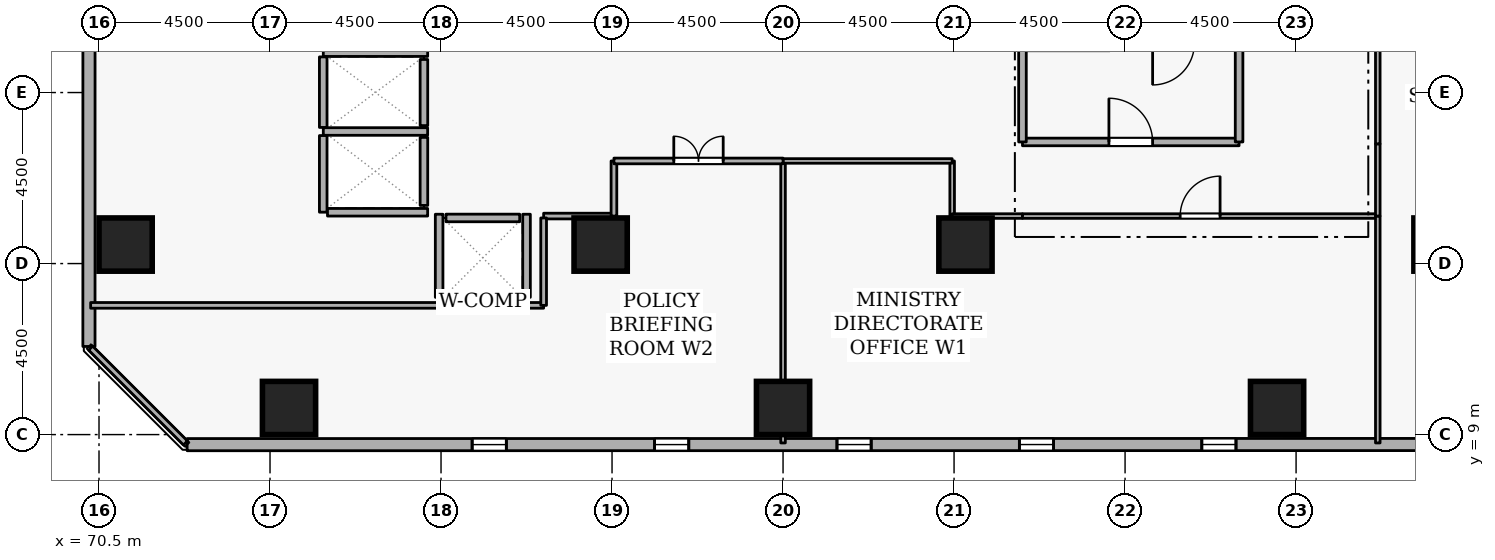
"""IFC4 building model, lengths in metres.
Left out: names, types, materials, properties, quantities, classifications, styles, units other than length and angle.
Written with IfcOpenShell. Run it as: python <this file> out.ifc"""

import sys

from ifc_helpers import new_model, si_unit, direction, frame, frame_2d, origin, origin_2d, place, context, subcontext, project, spatial, rectangle, extrude, element, fill, save


model = new_model("IFC4")
c1 = context("Model", 3, precision=1e-05, world=origin(), true_north=direction((0.0, 1.0)))
c2 = subcontext(c1, "Body", "Model", "MODEL_VIEW")
j1 = project(units=[si_unit("LENGTHUNIT", "METRE"), si_unit("PLANEANGLEUNIT", "RADIAN")], contexts=[c1])
p1 = place(None, origin())
s1 = spatial("IfcSite", under=j1, at=p1, CompositionType="ELEMENT")
p2 = place(p1, origin())
s2 = spatial("IfcBuilding", under=s1, at=p2, CompositionType="ELEMENT")
p3 = place(p2, frame((0.0, 0.0, 53.7)))
s3 = spatial("IfcBuildingStorey", under=s2, at=p3, CompositionType="ELEMENT", Elevation=53.7)
for number, where, z_axis, x_axis in (
    (1, (105.8, 14.0, 0.0), (0.0, 0.0, 1.0), (1.0, 0.0, 0.0)),
    (2, (71.2, 14.0, 0.0), (0.0, 0.0, 1.0), (1.0, 0.0, 0.0)),
    (3, (101.5, 9.7, 0.0), (0.0, 0.0, 1.0), (1.0, 0.0, 0.0)),
    (4, (88.5, 9.7, 0.0), (0.0, 0.0, 1.0), (1.0, 0.0, 0.0)),
    (5, (75.5, 9.7, 0.0), (0.0, 0.0, 1.0), (1.0, 0.0, 0.0)),
    (6, (93.3, 14.0, 0.0), (0.0, 0.0, 1.0), (1.0, 0.0, 0.0)),
    (7, (83.7, 14.0, 0.0), (0.0, 0.0, 1.0), (1.0, 0.0, 0.0)),
):
    element("IfcColumn", number, at=place(p3, frame(where, z_axis=z_axis, x_axis=x_axis)), inside=s3, PredefinedType="COLUMN", context=c2, shape_type="SweptSolid", body=[
        extrude(rectangle(XDim=1.4, YDim=1.4, at=origin_2d()), origin(), (0.0, 0.0, 1.0), 3.6),
    ])
p4 = place(p3, frame((72.819, 8.735, 0.0), z_axis=(0.0, 0.0, 1.0), x_axis=(0.999999992574, 0.000121872777, 0.0)))
e8 = element("IfcWall", 8, at=p4, inside=s3, PredefinedType="STANDARD", context=c2, shape_type="SweptSolid", body=[
    extrude(rectangle(XDim=36.058, YDim=0.32, at=frame_2d((18.029, 0.0))), origin(), (0.0, 0.0, 1.0), 2.7),
])
p5 = place(p4, frame((7.5, 0.0, 0.72)))
e9 = element("IfcOpeningElement", 9, at=p5, cuts=e8, PredefinedType="OPENING", context=c2, shape_type="SweptSolid", body=[
    extrude(rectangle(XDim=0.9, YDim=1.75, at=frame_2d((0.45, 0.875))), frame((0.0, 0.17, 0.0), z_axis=(0.0, -1.0, 0.0), x_axis=(1.0, 0.0, 0.0)), (0.0, 0.0, 1.0), 0.34),
])
p6 = place(p4, frame((12.3, 0.0, 0.72)))
e10 = element("IfcOpeningElement", 10, at=p6, cuts=e8, PredefinedType="OPENING", context=c2, shape_type="SweptSolid", body=[
    extrude(rectangle(XDim=0.9, YDim=1.75, at=frame_2d((0.45, 0.875))), frame((0.0, 0.17, 0.0), z_axis=(0.0, -1.0, 0.0), x_axis=(1.0, 0.0, 0.0)), (0.0, 0.0, 1.0), 0.34),
])
p7 = place(p4, frame((17.1, 0.0, 0.72)))
e11 = element("IfcOpeningElement", 11, at=p7, cuts=e8, PredefinedType="OPENING", context=c2, shape_type="SweptSolid", body=[
    extrude(rectangle(XDim=0.9, YDim=1.75, at=frame_2d((0.45, 0.875))), frame((0.0, 0.17, 0.0), z_axis=(0.0, -1.0, 0.0), x_axis=(1.0, 0.0, 0.0)), (0.0, 0.0, 1.0), 0.34),
])
p8 = place(p4, frame((21.9, 0.0, 0.72)))
e12 = element("IfcOpeningElement", 12, at=p8, cuts=e8, PredefinedType="OPENING", context=c2, shape_type="SweptSolid", body=[
    extrude(rectangle(XDim=0.9, YDim=1.75, at=frame_2d((0.45, 0.875))), frame((0.0, 0.17, 0.0), z_axis=(0.0, -1.0, 0.0), x_axis=(1.0, 0.0, 0.0)), (0.0, 0.0, 1.0), 0.34),
])
p9 = place(p4, frame((26.7, 0.0, 0.72)))
e13 = element("IfcOpeningElement", 13, at=p9, cuts=e8, PredefinedType="OPENING", context=c2, shape_type="SweptSolid", body=[
    extrude(rectangle(XDim=0.9, YDim=1.75, at=frame_2d((0.45, 0.875))), frame((0.0, 0.17, 0.0), z_axis=(0.0, -1.0, 0.0), x_axis=(1.0, 0.0, 0.0)), (0.0, 0.0, 1.0), 0.34),
])
p10 = place(p3, frame((70.24, 47.377, 0.0), z_axis=(0.0, 0.0, 1.0), x_axis=(-0.000121872777, -0.999999992574, 0.0)))
e14 = element("IfcWall", 14, at=p10, inside=s3, PredefinedType="STANDARD", context=c2, shape_type="SweptSolid", body=[
    extrude(rectangle(XDim=36.058, YDim=0.32, at=frame_2d((18.029, 0.0))), origin(), (0.0, 0.0, 1.0), 2.7),
])
p11 = place(p10, frame((2.7, 0.0, 0.72)))
e15 = element("IfcOpeningElement", 15, at=p11, cuts=e14, PredefinedType="OPENING", context=c2, shape_type="SweptSolid", body=[
    extrude(rectangle(XDim=0.9, YDim=1.75, at=frame_2d((0.45, 0.875))), frame((0.0, 0.17, 0.0), z_axis=(0.0, -1.0, 0.0), x_axis=(1.0, 0.0, 0.0)), (0.0, 0.0, 1.0), 0.34),
])
p12 = place(p10, frame((12.3, 0.0, 0.72)))
e16 = element("IfcOpeningElement", 16, at=p12, cuts=e14, PredefinedType="OPENING", context=c2, shape_type="SweptSolid", body=[
    extrude(rectangle(XDim=0.9, YDim=1.75, at=frame_2d((0.45, 0.875))), frame((0.0, 0.17, 0.0), z_axis=(0.0, -1.0, 0.0), x_axis=(1.0, 0.0, 0.0)), (0.0, 0.0, 1.0), 0.34),
])
p13 = place(p10, frame((17.1, 0.0, 0.72)))
e17 = element("IfcOpeningElement", 17, at=p13, cuts=e14, PredefinedType="OPENING", context=c2, shape_type="SweptSolid", body=[
    extrude(rectangle(XDim=0.9, YDim=1.75, at=frame_2d((0.45, 0.875))), frame((0.0, 0.17, 0.0), z_axis=(0.0, -1.0, 0.0), x_axis=(1.0, 0.0, 0.0)), (0.0, 0.0, 1.0), 0.34),
])
p14 = place(p10, frame((21.9, 0.0, 0.72)))
e18 = element("IfcOpeningElement", 18, at=p14, cuts=e14, PredefinedType="OPENING", context=c2, shape_type="SweptSolid", body=[
    extrude(rectangle(XDim=0.9, YDim=1.75, at=frame_2d((0.45, 0.875))), frame((0.0, 0.17, 0.0), z_axis=(0.0, -1.0, 0.0), x_axis=(1.0, 0.0, 0.0)), (0.0, 0.0, 1.0), 0.34),
])
p15 = place(p10, frame((26.7, 0.0, 0.72)))
e19 = element("IfcOpeningElement", 19, at=p15, cuts=e14, PredefinedType="OPENING", context=c2, shape_type="SweptSolid", body=[
    extrude(rectangle(XDim=0.9, YDim=1.75, at=frame_2d((0.45, 0.875))), frame((0.0, 0.17, 0.0), z_axis=(0.0, -1.0, 0.0), x_axis=(1.0, 0.0, 0.0)), (0.0, 0.0, 1.0), 0.34),
])
p16 = place(p3, frame((79.05, 17.13, 0.0), z_axis=(0.0, 0.0, 1.0), x_axis=(0.0, 1.0, 0.0)))
e20 = element("IfcWall", 20, at=p16, inside=s3, PredefinedType="STANDARD", context=c2, shape_type="SweptSolid", body=[
    extrude(rectangle(XDim=1.74, YDim=0.2, at=frame_2d((0.87, 0.0))), origin(), (0.0, 0.0, 1.0), 3.34),
])
p17 = place(p3, frame((79.05, 15.03, 0.0), z_axis=(0.0, 0.0, 1.0), x_axis=(0.0, 1.0, 0.0)))
e21 = element("IfcWall", 21, at=p17, inside=s3, PredefinedType="STANDARD", context=c2, shape_type="SweptSolid", body=[
    extrude(rectangle(XDim=1.79, YDim=0.2, at=frame_2d((0.895, 0.0))), origin(), (0.0, 0.0, 1.0), 3.34),
])
p18 = place(p3, frame((79.63, 14.7, 0.0), z_axis=(0.0, 0.0, 1.0), x_axis=(1.0, 0.0, 0.0)))
e22 = element("IfcWall", 22, at=p18, inside=s3, PredefinedType="STANDARD", context=c2, shape_type="SweptSolid", body=[
    extrude(rectangle(XDim=1.94, YDim=0.2, at=frame_2d((0.97, 0.0))), origin(), (0.0, 0.0, 1.0), 3.34),
])
p19 = place(p3, frame((76.402, 19.05, 0.0), z_axis=(0.0, 0.0, 1.0), x_axis=(1.0, 0.0, 0.0)))
e23 = element("IfcWall", 23, at=p19, inside=s3, PredefinedType="STANDARD", context=c2, shape_type="SweptSolid", body=[
    extrude(rectangle(XDim=2.746, YDim=0.2, at=frame_2d((1.373, 0.0))), origin(), (0.0, 0.0, 1.0), 2.545),
])
p20 = place(p3, frame((76.402, 16.975, 0.0), z_axis=(0.0, 0.0, 1.0), x_axis=(1.0, 0.0, 0.0)))
e24 = element("IfcWall", 24, at=p20, inside=s3, PredefinedType="STANDARD", context=c2, shape_type="SweptSolid", body=[
    extrude(rectangle(XDim=2.746, YDim=0.2, at=frame_2d((1.373, 0.0))), origin(), (0.0, 0.0, 1.0), 3.34),
])
p21 = place(p3, frame((76.4, 14.852, 0.0), z_axis=(0.0, 0.0, 1.0), x_axis=(0.0, 1.0, 0.0)))
e25 = element("IfcWall", 25, at=p21, inside=s3, PredefinedType="STANDARD", context=c2, shape_type="SweptSolid", body=[
    extrude(rectangle(XDim=2.016, YDim=0.2, at=frame_2d((1.008, 0.0))), origin(), (0.0, 0.0, 1.0), 3.34),
])
p22 = place(p3, frame((76.4, 17.082, 0.0), z_axis=(0.0, 0.0, 1.0), x_axis=(0.0, 1.0, 0.0)))
e26 = element("IfcWall", 26, at=p22, inside=s3, PredefinedType="STANDARD", context=c2, shape_type="SweptSolid", body=[
    extrude(rectangle(XDim=1.856, YDim=0.2, at=frame_2d((0.928, 0.0))), origin(), (0.0, 0.0, 1.0), 3.34),
])
p23 = place(p3, frame((76.512, 14.85, 0.0), z_axis=(0.0, 0.0, 1.0), x_axis=(1.0, 0.0, 0.0)))
e27 = element("IfcWall", 27, at=p23, inside=s3, PredefinedType="STANDARD", context=c2, shape_type="SweptSolid", body=[
    extrude(rectangle(XDim=2.636, YDim=0.2, at=frame_2d((1.318, 0.0))), origin(), (0.0, 0.0, 1.0), 3.34),
])
p24 = place(p3, frame((79.452, 12.5, 0.0), z_axis=(0.0, 0.0, 1.0), x_axis=(1.0, 0.0, 0.0)))
e28 = element("IfcWall", 28, at=p24, inside=s3, PredefinedType="STANDARD", context=c2, shape_type="SweptSolid", body=[
    extrude(rectangle(XDim=2.296, YDim=0.2, at=frame_2d((1.148, 0.0))), origin(), (0.0, 0.0, 1.0), 3.34),
])
for number, where, z_axis, x_axis in (
    (29, (81.75, 12.612, 0.0), (0.0, 0.0, 1.0), (0.0, 1.0, 0.0)),
    (30, (79.45, 12.612, 0.0), (0.0, 0.0, 1.0), (0.0, 1.0, 0.0)),
):
    element("IfcWall", number, at=place(p3, frame(where, z_axis=z_axis, x_axis=x_axis)), inside=s3, PredefinedType="STANDARD", context=c2, shape_type="SweptSolid", body=[
        extrude(rectangle(XDim=2.186, YDim=0.2, at=frame_2d((1.093, 0.0))), origin(), (0.0, 0.0, 1.0), 3.34),
    ])
p25 = place(p3, frame((94.8, 16.7, 0.0), z_axis=(0.0, 0.0, 1.0), x_axis=(1.0, 0.0, 0.0)))
e31 = element("IfcWall", 31, at=p25, inside=s3, PredefinedType="STANDARD", context=c2, shape_type="SweptSolid", body=[
    extrude(rectangle(XDim=5.7, YDim=0.2, at=frame_2d((2.85, 0.0))), origin(), (0.0, 0.0, 1.0), 3.34),
])
p26 = place(p25, frame((2.275, 0.0, 0.0)))
e32 = element("IfcOpeningElement", 32, at=p26, cuts=e31, PredefinedType="OPENING", context=c2, shape_type="SweptSolid", body=[
    extrude(rectangle(XDim=1.15, YDim=2.1, at=frame_2d((0.575, 1.05))), frame((0.0, 0.11, 0.0), z_axis=(0.0, -1.0, 0.0), x_axis=(1.0, 0.0, 0.0)), (0.0, 0.0, 1.0), 0.22),
])
for number, where, z_axis, x_axis in (
    (33, (100.5, 16.7, 0.0), (0.0, 0.0, 1.0), (0.0, 1.0, 0.0)),
    (34, (94.8, 19.2, 0.0), (0.0, 0.0, 1.0), (0.0, -1.0, 0.0)),
):
    element("IfcWall", number, at=place(p3, frame(where, z_axis=z_axis, x_axis=x_axis)), inside=s3, PredefinedType="STANDARD", context=c2, shape_type="SweptSolid", body=[
        extrude(rectangle(XDim=2.5, YDim=0.2, at=frame_2d((1.25, 0.0))), origin(), (0.0, 0.0, 1.0), 3.34),
    ])
p27 = place(p3, frame((92.95, 16.2, 0.0), z_axis=(0.0, 0.0, 1.0), x_axis=(0.0, -1.0, 0.0)))
e35 = element("IfcWall", 35, at=p27, inside=s3, PredefinedType="PARTITIONING", context=c2, shape_type="SweptSolid", body=[
    extrude(rectangle(XDim=1.45, YDim=0.12, at=frame_2d((0.725, 0.0))), origin(), (0.0, 0.0, 1.0), 3.34),
])
p28 = place(p3, frame((92.95, 14.75, 0.0), z_axis=(0.0, 0.0, 1.0), x_axis=(1.0, 0.0, 0.0)))
e36 = element("IfcWall", 36, at=p28, inside=s3, PredefinedType="PARTITIONING", context=c2, shape_type="SweptSolid", body=[
    extrude(rectangle(XDim=1.85, YDim=0.12, at=frame_2d((0.925, 0.0))), origin(), (0.0, 0.0, 1.0), 3.34),
])
p29 = place(p3, frame((94.8, 14.75, 0.0), z_axis=(0.0, 0.0, 1.0), x_axis=(1.0, 0.0, 0.0)))
e37 = element("IfcWall", 37, at=p29, inside=s3, PredefinedType="PARTITIONING", context=c2, shape_type="SweptSolid", body=[
    extrude(rectangle(XDim=9.35, YDim=0.12, at=frame_2d((4.675, 0.0))), origin(), (0.0, 0.0, 1.0), 3.34),
])
p30 = place(p29, frame((4.15, 0.0, 0.0)))
e38 = element("IfcOpeningElement", 38, at=p30, cuts=e37, PredefinedType="OPENING", context=c2, shape_type="SweptSolid", body=[
    extrude(rectangle(XDim=1.05, YDim=2.1, at=frame_2d((0.525, 1.05))), frame((0.0, 0.07, 0.0), z_axis=(0.0, -1.0, 0.0), x_axis=(1.0, 0.0, 0.0)), (0.0, 0.0, 1.0), 0.14),
])
p31 = place(p3, frame((104.15, 14.75, 0.0), z_axis=(0.0, 0.0, 1.0), x_axis=(0.0, -1.0, 0.0)))
e39 = element("IfcWall", 39, at=p31, inside=s3, PredefinedType="PARTITIONING", context=c2, shape_type="SweptSolid", body=[
    extrude(rectangle(XDim=5.97, YDim=0.12, at=frame_2d((2.985, 0.0))), origin(), (0.0, 0.0, 1.0), 3.34),
])
p32 = place(p3, frame((88.5, 8.78, 0.0), z_axis=(0.0, 0.0, 1.0), x_axis=(0.0, 1.0, 0.0)))
e40 = element("IfcWall", 40, at=p32, inside=s3, PredefinedType="PARTITIONING", context=c2, shape_type="SweptSolid", body=[
    extrude(rectangle(XDim=7.42, YDim=0.12, at=frame_2d((3.71, 0.0))), origin(), (0.0, 0.0, 1.0), 2.932),
])
p33 = place(p3, frame((88.5, 16.2, 0.0), z_axis=(0.0, 0.0, 1.0), x_axis=(1.0, 0.0, 0.0)))
e41 = element("IfcWall", 41, at=p33, inside=s3, PredefinedType="PARTITIONING", context=c2, shape_type="SweptSolid", body=[
    extrude(rectangle(XDim=4.45, YDim=0.12, at=frame_2d((2.225, 0.0))), origin(), (0.0, 0.0, 1.0), 3.34),
])
p34 = place(p3, frame((82.2, 14.75, 0.0), z_axis=(0.0, 0.0, 1.0), x_axis=(1.0, 0.0, 0.0)))
e42 = element("IfcWall", 42, at=p34, inside=s3, PredefinedType="PARTITIONING", context=c2, shape_type="SweptSolid", body=[
    extrude(rectangle(XDim=1.85, YDim=0.15, at=frame_2d((0.925, 0.0))), origin(), (0.0, 0.0, 1.0), 3.34),
])
p35 = place(p3, frame((84.05, 14.75, 0.0), z_axis=(0.0, 0.0, 1.0), x_axis=(0.0, 1.0, 0.0)))
e43 = element("IfcWall", 43, at=p35, inside=s3, PredefinedType="PARTITIONING", context=c2, shape_type="SweptSolid", body=[
    extrude(rectangle(XDim=1.45, YDim=0.15, at=frame_2d((0.725, 0.0))), origin(), (0.0, 0.0, 1.0), 3.34),
])
p36 = place(p3, frame((84.05, 16.2, 0.0), z_axis=(0.0, 0.0, 1.0), x_axis=(1.0, 0.0, 0.0)))
e44 = element("IfcWall", 44, at=p36, inside=s3, PredefinedType="PARTITIONING", context=c2, shape_type="SweptSolid", body=[
    extrude(rectangle(XDim=4.45, YDim=0.15, at=frame_2d((2.225, 0.0))), origin(), (0.0, 0.0, 1.0), 3.34),
])
p37 = place(p36, frame((1.575, 0.0, 0.0)))
e45 = element("IfcOpeningElement", 45, at=p37, cuts=e44, PredefinedType="OPENING", context=c2, shape_type="SweptSolid", body=[
    extrude(rectangle(XDim=1.3, YDim=2.12, at=frame_2d((0.65, 1.06))), frame((0.0, 0.085, 0.0), z_axis=(0.0, -1.0, 0.0), x_axis=(1.0, 0.0, 0.0)), (0.0, 0.0, 1.0), 0.17),
])
p38 = place(p3, frame((72.775, 8.78, 0.0), z_axis=(0.0, 0.0, 1.0), x_axis=(-0.707106781187, 0.707106781187, 0.0)))
e46 = element("IfcWall", 46, at=p38, inside=s3, PredefinedType="PARTITIONING", context=c2, shape_type="SweptSolid", body=[
    extrude(rectangle(XDim=3.528, YDim=0.15, at=frame_2d((1.764, 0.0))), origin(), (0.0, 0.0, 1.0), 3.34),
])
p39 = place(p3, frame((70.28, 12.4, 0.0), z_axis=(0.0, 0.0, 1.0), x_axis=(1.0, 0.0, 0.0)))
e47 = element("IfcWall", 47, at=p39, inside=s3, PredefinedType="PARTITIONING", context=c2, shape_type="SweptSolid", body=[
    extrude(rectangle(XDim=9.172, YDim=0.15, at=frame_2d((4.586, 0.0))), origin(), (0.0, 0.0, 1.0), 3.34),
])
p40 = place(p3, frame((81.748, 12.4, 0.0), z_axis=(0.0, 0.0, 1.0), x_axis=(1.0, 0.0, 0.0)))
e48 = element("IfcWall", 48, at=p40, inside=s3, PredefinedType="PARTITIONING", context=c2, shape_type="SweptSolid", body=[
    extrude(rectangle(XDim=0.452, YDim=0.15, at=frame_2d((0.226, 0.0))), origin(), (0.0, 0.0, 1.0), 3.34),
])
p41 = place(p3, frame((82.2, 12.4, 0.0), z_axis=(0.0, 0.0, 1.0), x_axis=(0.0, 1.0, 0.0)))
e49 = element("IfcWall", 49, at=p41, inside=s3, PredefinedType="PARTITIONING", context=c2, shape_type="SweptSolid", body=[
    extrude(rectangle(XDim=2.3, YDim=0.15, at=frame_2d((1.15, 0.0))), origin(), (0.0, 0.0, 1.0), 3.34),
])
p42 = place(p3, frame((104.15, 14.75, 0.0), z_axis=(0.0, 0.0, 1.0), x_axis=(0.0, 1.0, 0.0)))
e50 = element("IfcWall", 50, at=p42, inside=s3, PredefinedType="PARTITIONING", context=c2, shape_type="SweptSolid", body=[
    extrude(rectangle(XDim=1.9, YDim=0.12, at=frame_2d((0.95, 0.0))), origin(), (0.0, 0.0, 1.0), 3.34),
])
p43 = place(p3, frame((104.15, 16.65, 0.0), z_axis=(0.0, 0.0, 1.0), x_axis=(0.0, 1.0, 0.0)))
e51 = element("IfcWall", 51, at=p43, inside=s3, PredefinedType="PARTITIONING", context=c2, shape_type="SweptSolid", body=[
    extrude(rectangle(XDim=10.35, YDim=0.12, at=frame_2d((5.175, 0.0))), origin(), (0.0, 0.0, 1.0), 3.34),
])
p44 = place(p43, frame((4.65, 0.0, 0.0)))
e52 = element("IfcOpeningElement", 52, at=p44, cuts=e51, PredefinedType="OPENING", context=c2, shape_type="SweptSolid", body=[
    extrude(rectangle(XDim=1.05, YDim=2.1, at=frame_2d((0.525, 1.05))), frame((0.0, 0.07, 0.0), z_axis=(0.0, -1.0, 0.0), x_axis=(1.0, 0.0, 0.0)), (0.0, 0.0, 1.0), 0.14),
])
p45 = place(p5, origin())
e53 = element("IfcWindow", 53, at=p45, inside=s3, PartitioningType="SINGLE_PANEL", PredefinedType="WINDOW", context=c2, shape_type="SweptSolid", body=[
    extrude(rectangle(XDim=0.9, YDim=1.75, at=frame_2d((0.45, 0.875))), frame((0.0, 0.03, 0.0), z_axis=(0.0, -1.0, 0.0), x_axis=(1.0, 0.0, 0.0)), (0.0, 0.0, 1.0), 0.06),
])
fill(e9, e53)
p46 = place(p6, origin())
e54 = element("IfcWindow", 54, at=p46, inside=s3, PartitioningType="SINGLE_PANEL", PredefinedType="WINDOW", context=c2, shape_type="SweptSolid", body=[
    extrude(rectangle(XDim=0.9, YDim=1.75, at=frame_2d((0.45, 0.875))), frame((0.0, 0.03, 0.0), z_axis=(0.0, -1.0, 0.0), x_axis=(1.0, 0.0, 0.0)), (0.0, 0.0, 1.0), 0.06),
])
fill(e10, e54)
p47 = place(p7, origin())
e55 = element("IfcWindow", 55, at=p47, inside=s3, PartitioningType="SINGLE_PANEL", PredefinedType="WINDOW", context=c2, shape_type="SweptSolid", body=[
    extrude(rectangle(XDim=0.9, YDim=1.75, at=frame_2d((0.45, 0.875))), frame((0.0, 0.03, 0.0), z_axis=(0.0, -1.0, 0.0), x_axis=(1.0, 0.0, 0.0)), (0.0, 0.0, 1.0), 0.06),
])
fill(e11, e55)
p48 = place(p8, origin())
e56 = element("IfcWindow", 56, at=p48, inside=s3, PartitioningType="SINGLE_PANEL", PredefinedType="WINDOW", context=c2, shape_type="SweptSolid", body=[
    extrude(rectangle(XDim=0.9, YDim=1.75, at=frame_2d((0.45, 0.875))), frame((0.0, 0.03, 0.0), z_axis=(0.0, -1.0, 0.0), x_axis=(1.0, 0.0, 0.0)), (0.0, 0.0, 1.0), 0.06),
])
fill(e12, e56)
p49 = place(p9, origin())
e57 = element("IfcWindow", 57, at=p49, inside=s3, PartitioningType="SINGLE_PANEL", PredefinedType="WINDOW", context=c2, shape_type="SweptSolid", body=[
    extrude(rectangle(XDim=0.9, YDim=1.75, at=frame_2d((0.45, 0.875))), frame((0.0, 0.03, 0.0), z_axis=(0.0, -1.0, 0.0), x_axis=(1.0, 0.0, 0.0)), (0.0, 0.0, 1.0), 0.06),
])
fill(e13, e57)
p50 = place(p26, origin())
e58 = element("IfcDoor", 58, at=p50, inside=s3, OperationType="SINGLE_SWING_LEFT", PredefinedType="DOOR", context=c2, shape_type="SweptSolid", body=[
    extrude(rectangle(XDim=1.15, YDim=2.1, at=frame_2d((0.575, 1.05))), frame((0.0, 0.025, 0.0), z_axis=(0.0, -1.0, 0.0), x_axis=(1.0, 0.0, 0.0)), (0.0, 0.0, 1.0), 0.05),
])
fill(e32, e58)
p51 = place(p30, origin())
e59 = element("IfcDoor", 59, at=p51, inside=s3, OperationType="SINGLE_SWING_RIGHT", PredefinedType="DOOR", context=c2, shape_type="SweptSolid", body=[
    extrude(rectangle(XDim=1.05, YDim=2.1, at=frame_2d((0.525, 1.05))), frame((0.0, 0.025, 0.0), z_axis=(0.0, -1.0, 0.0), x_axis=(1.0, 0.0, 0.0)), (0.0, 0.0, 1.0), 0.05),
])
fill(e38, e59)
p52 = place(p37, origin())
e60 = element("IfcDoor", 60, at=p52, inside=s3, OperationType="DOUBLE_DOOR_SINGLE_SWING", PredefinedType="DOOR", context=c2, shape_type="SweptSolid", body=[
    extrude(rectangle(XDim=1.3, YDim=2.12, at=frame_2d((0.65, 1.06))), frame((0.0, 0.025, 0.0), z_axis=(0.0, -1.0, 0.0), x_axis=(1.0, 0.0, 0.0)), (0.0, 0.0, 1.0), 0.05),
])
fill(e45, e60)
save(model, sys.argv[1])
